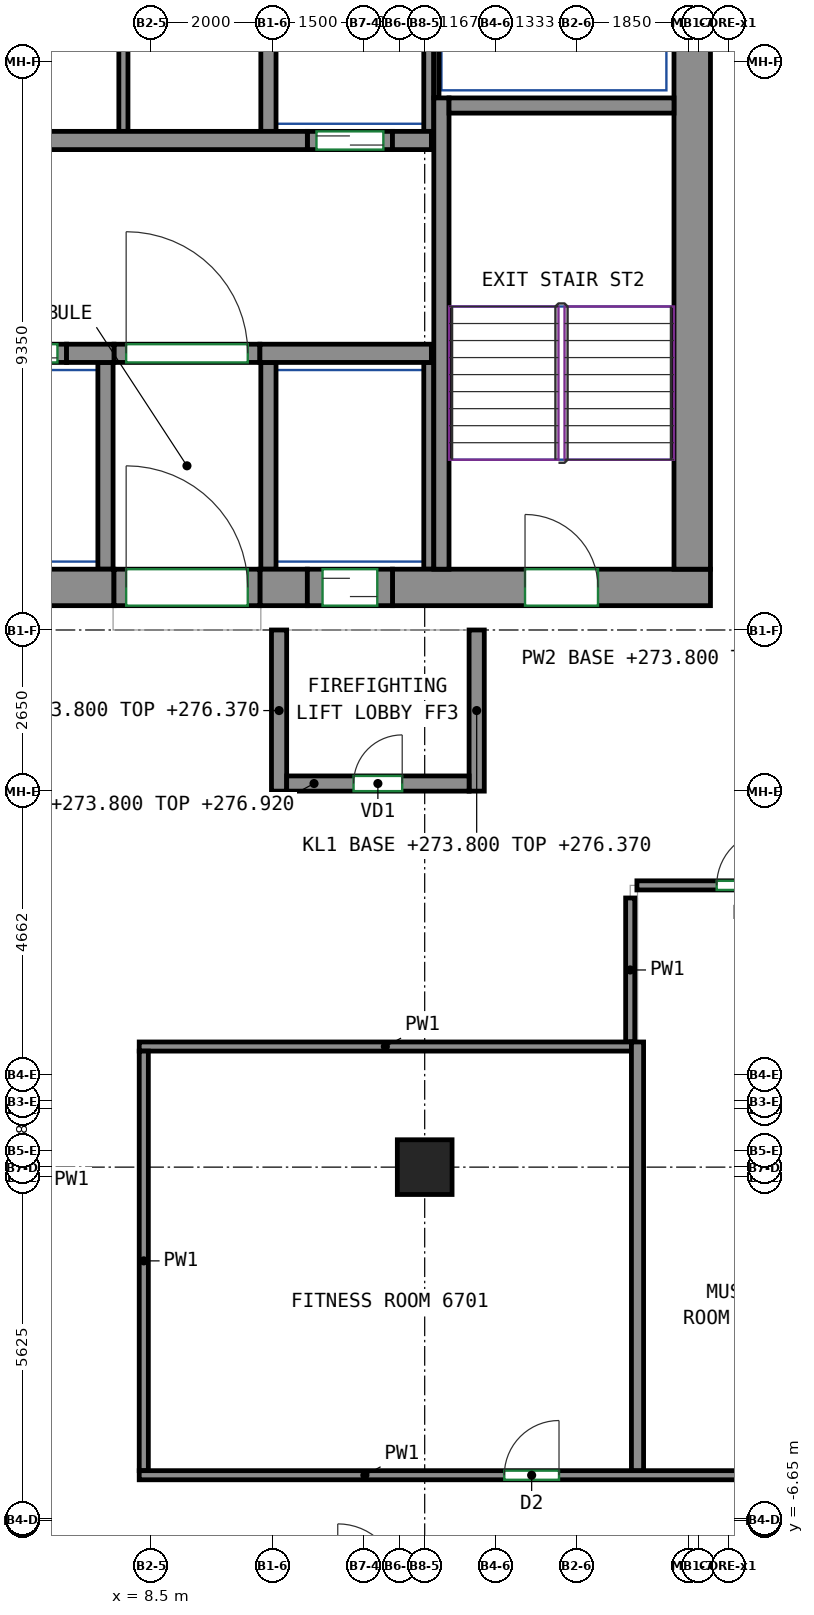
"""IFC4 building model, lengths in metres.
Left out: names, types, materials, properties, quantities, classifications, styles, units other than length and angle.
Written with IfcOpenShell. Run it as: python <this file> out.ifc"""

import sys

from ifc_helpers import new_model, si_unit, direction, frame, frame_2d, origin, origin_2d, place, context, subcontext, project, spatial, rectangle, extrude, source, transform, mapped, element, fill, save


model = new_model("IFC4")
c1 = context("Model", 3, precision=1e-05, world=origin(), true_north=direction((0.0, 1.0)))
c2 = subcontext(c1, "Body", "Model", "MODEL_VIEW")
j1 = project(units=[si_unit("LENGTHUNIT", "METRE"), si_unit("PLANEANGLEUNIT", "RADIAN")], contexts=[c1])
p1 = place(None, origin())
s1 = spatial("IfcSite", under=j1, at=p1, CompositionType="ELEMENT")
p2 = place(p1, origin())
s2 = spatial("IfcBuilding", under=s1, at=p2, CompositionType="ELEMENT")
p3 = place(p2, frame((0.0, 0.0, 273.8)))
s3 = spatial("IfcBuildingStorey", under=s2, at=p3, CompositionType="ELEMENT", Elevation=273.8)
m1 = source(origin(), c2, "Body", "SweptSolid", [
    extrude(rectangle(XDim=0.9, YDim=0.9, at=origin_2d()), origin(), (0.0, 0.0, 1.0), 3.12),
])
p4 = place(p3, frame((13.0, -0.833, 0.0), z_axis=(0.0, 0.0, 1.0), x_axis=(1.0, 0.0, 0.0)))
e1 = element("IfcColumn", 1, at=p4, inside=s3, PredefinedType="COLUMN", context=c2, shape_type="MappedRepresentation", body=[
    mapped(m1, transform((0.0, 0.0, 0.0))),
])
m2 = source(origin(), c2, "Body", "SweptSolid", [
    extrude(rectangle(XDim=14.18, YDim=0.6, at=frame_2d((7.09, 0.0))), origin(), (0.0, 0.0, 1.0), 3.12),
])
p5 = place(p3, frame((-6.29, 8.7, 0.0), z_axis=(0.0, 0.0, 1.0), x_axis=(1.0, 0.0, 0.0)))
e2 = element("IfcWall", 2, at=p5, inside=s3, PredefinedType="SHEAR", context=c2, shape_type="MappedRepresentation", body=[
    mapped(m2, transform((0.0, 0.0, 0.0))),
])
m3 = source(origin(), c2, "Body", "SweptSolid", [
    extrude(rectangle(XDim=0.78, YDim=0.6, at=frame_2d((0.39, 0.0))), origin(), (0.0, 0.0, 1.0), 3.12),
])
p6 = place(p3, frame((10.29, 8.7, 0.0), z_axis=(0.0, 0.0, 1.0), x_axis=(1.0, 0.0, 0.0)))
e3 = element("IfcWall", 3, at=p6, inside=s3, PredefinedType="SHEAR", context=c2, shape_type="MappedRepresentation", body=[
    mapped(m3, transform((0.0, 0.0, 0.0))),
])
m4 = source(origin(), c2, "Body", "SweptSolid", [
    extrude(rectangle(XDim=5.23, YDim=0.6, at=frame_2d((2.615, 0.0))), origin(), (0.0, 0.0, 1.0), 3.12),
])
p7 = place(p3, frame((12.47, 8.7, 0.0), z_axis=(0.0, 0.0, 1.0), x_axis=(1.0, 0.0, 0.0)))
e4 = element("IfcWall", 4, at=p7, inside=s3, PredefinedType="SHEAR", context=c2, shape_type="MappedRepresentation", body=[
    mapped(m4, transform((0.0, 0.0, 0.0))),
])
p8 = place(p7, frame((2.18, 0.0, 0.0)))
e5 = element("IfcOpeningElement", 5, at=p8, cuts=e4, PredefinedType="OPENING", context=c2, shape_type="SweptSolid", body=[
    extrude(rectangle(XDim=1.2, YDim=2.1, at=frame_2d((0.6, 1.05))), frame((0.0, 0.31, 0.0), z_axis=(0.0, -1.0, 0.0), x_axis=(1.0, 0.0, 0.0)), (0.0, 0.0, 1.0), 0.62),
])
m5 = source(origin(), c2, "Body", "SweptSolid", [
    extrude(rectangle(XDim=12.0, YDim=0.6, at=frame_2d((6.0, 0.0))), origin(), (0.0, 0.0, 1.0), 3.12),
])
p9 = place(p3, frame((17.4, 9.0, 0.0), z_axis=(0.0, 0.0, 1.0), x_axis=(0.0, 1.0, 0.0)))
e6 = element("IfcWall", 6, at=p9, inside=s3, PredefinedType="SHEAR", context=c2, shape_type="MappedRepresentation", body=[
    mapped(m5, transform((0.0, 0.0, 0.0))),
])
m6 = source(origin(), c2, "Body", "SweptSolid", [
    extrude(rectangle(XDim=7.75, YDim=0.25, at=frame_2d((3.875, 0.0))), origin(), (0.0, 0.0, 1.0), 3.12),
])
p10 = place(p3, frame((13.275, 9.0, 0.0), z_axis=(0.0, 0.0, 1.0), x_axis=(0.0, 1.0, 0.0)))
e7 = element("IfcWall", 7, at=p10, inside=s3, PredefinedType="SHEAR", context=c2, shape_type="MappedRepresentation", body=[
    mapped(m6, transform((0.0, 0.0, 0.0))),
])
m7 = source(origin(), c2, "Body", "SweptSolid", [
    extrude(rectangle(XDim=3.7, YDim=0.25, at=frame_2d((1.85, 0.0))), origin(), (0.0, 0.0, 1.0), 3.12),
])
p11 = place(p3, frame((13.4, 16.625, 0.0), z_axis=(0.0, 0.0, 1.0), x_axis=(1.0, 0.0, 0.0)))
e8 = element("IfcWall", 8, at=p11, inside=s3, PredefinedType="SHEAR", context=c2, shape_type="MappedRepresentation", body=[
    mapped(m7, transform((0.0, 0.0, 0.0))),
])
m8 = source(origin(), c2, "Body", "SweptSolid", [
    extrude(rectangle(XDim=0.78, YDim=0.3, at=frame_2d((0.39, 0.0))), origin(), (0.0, 0.0, 1.0), 3.12),
])
p12 = place(p3, frame((7.11, 12.55, 0.0), z_axis=(0.0, 0.0, 1.0), x_axis=(1.0, 0.0, 0.0)))
e9 = element("IfcWall", 9, at=p12, inside=s3, PredefinedType="SHEAR", context=c2, shape_type="MappedRepresentation", body=[
    mapped(m8, transform((0.0, 0.0, 0.0))),
])
m9 = source(origin(), c2, "Body", "SweptSolid", [
    extrude(rectangle(XDim=2.82, YDim=0.3, at=frame_2d((1.41, 0.0))), origin(), (0.0, 0.0, 1.0), 3.12),
])
p13 = place(p3, frame((10.29, 12.55, 0.0), z_axis=(0.0, 0.0, 1.0), x_axis=(1.0, 0.0, 0.0)))
e10 = element("IfcWall", 10, at=p13, inside=s3, PredefinedType="SHEAR", context=c2, shape_type="MappedRepresentation", body=[
    mapped(m9, transform((0.0, 0.0, 0.0))),
])
m10 = source(origin(), c2, "Body", "SweptSolid", [
    extrude(rectangle(XDim=22.08, YDim=0.3, at=frame_2d((11.04, 0.0))), origin(), (0.0, 0.0, 1.0), 3.12),
])
p14 = place(p3, frame((-11.01, 16.05, 0.0), z_axis=(0.0, 0.0, 1.0), x_axis=(1.0, 0.0, 0.0)))
e11 = element("IfcWall", 11, at=p14, inside=s3, PredefinedType="SHEAR", context=c2, shape_type="MappedRepresentation", body=[
    mapped(m10, transform((0.0, 0.0, 0.0))),
])
m11 = source(origin(), c2, "Body", "SweptSolid", [
    extrude(rectangle(XDim=0.64, YDim=0.3, at=frame_2d((0.32, 0.0))), origin(), (0.0, 0.0, 1.0), 3.12),
])
p15 = place(p3, frame((12.47, 16.05, 0.0), z_axis=(0.0, 0.0, 1.0), x_axis=(1.0, 0.0, 0.0)))
e12 = element("IfcWall", 12, at=p15, inside=s3, PredefinedType="SHEAR", context=c2, shape_type="MappedRepresentation", body=[
    mapped(m11, transform((0.0, 0.0, 0.0))),
])
m12 = source(origin(), c2, "Body", "SweptSolid", [
    extrude(rectangle(XDim=1.4, YDim=0.3, at=frame_2d((0.7, 0.0))), origin(), (0.0, 0.0, 1.0), 3.12),
])
p16 = place(p3, frame((5.71, 12.55, 0.0), z_axis=(0.0, 0.0, 1.0), x_axis=(1.0, 0.0, 0.0)))
e13 = element("IfcWall", 13, at=p16, inside=s3, PredefinedType="PARTITIONING", context=c2, shape_type="MappedRepresentation", body=[
    mapped(m12, transform((0.0, 0.0, 0.0))),
])
p17 = place(p16, frame((0.15, 0.0, 0.0)))
e14 = element("IfcOpeningElement", 14, at=p17, cuts=e13, PredefinedType="OPENING", context=c2, shape_type="SweptSolid", body=[
    extrude(rectangle(XDim=1.1, YDim=2.1, at=frame_2d((0.55, 1.05))), frame((0.0, 0.16, 0.0), z_axis=(0.0, -1.0, 0.0), x_axis=(1.0, 0.0, 0.0)), (0.0, 0.0, 1.0), 0.32),
])
m13 = source(origin(), c2, "Body", "SweptSolid", [
    extrude(rectangle(XDim=1.4, YDim=0.3, at=frame_2d((0.7, 0.0))), origin(), (0.0, 0.0, 1.0), 3.12),
])
p18 = place(p3, frame((11.07, 16.05, 0.0), z_axis=(0.0, 0.0, 1.0), x_axis=(1.0, 0.0, 0.0)))
e15 = element("IfcWall", 15, at=p18, inside=s3, PredefinedType="PARTITIONING", context=c2, shape_type="MappedRepresentation", body=[
    mapped(m13, transform((0.0, 0.0, 0.0))),
])
p19 = place(p18, frame((0.15, 0.0, 0.0)))
e16 = element("IfcOpeningElement", 16, at=p19, cuts=e15, PredefinedType="OPENING", context=c2, shape_type="SweptSolid", body=[
    extrude(rectangle(XDim=1.1, YDim=2.1, at=frame_2d((0.55, 1.05))), frame((0.0, 0.16, 0.0), z_axis=(0.0, -1.0, 0.0), x_axis=(1.0, 0.0, 0.0)), (0.0, 0.0, 1.0), 0.32),
])
m14 = source(origin(), c2, "Body", "SweptSolid", [
    extrude(rectangle(XDim=2.4, YDim=0.3, at=frame_2d((1.2, 0.0))), origin(), (0.0, 0.0, 1.0), 3.12),
])
p20 = place(p3, frame((7.89, 12.55, 0.0), z_axis=(0.0, 0.0, 1.0), x_axis=(1.0, 0.0, 0.0)))
e17 = element("IfcWall", 17, at=p20, inside=s3, PredefinedType="PARTITIONING", context=c2, shape_type="MappedRepresentation", body=[
    mapped(m14, transform((0.0, 0.0, 0.0))),
])
p21 = place(p20, frame((0.2, 0.0, 0.0)))
e18 = element("IfcOpeningElement", 18, at=p21, cuts=e17, PredefinedType="OPENING", context=c2, shape_type="SweptSolid", body=[
    extrude(rectangle(XDim=2.0, YDim=2.1, at=frame_2d((1.0, 1.05))), frame((0.0, 0.16, 0.0), z_axis=(0.0, -1.0, 0.0), x_axis=(1.0, 0.0, 0.0)), (0.0, 0.0, 1.0), 0.32),
])
m15 = source(origin(), c2, "Body", "SweptSolid", [
    extrude(rectangle(XDim=2.65, YDim=0.25, at=frame_2d((1.325, 0.0))), origin(), (0.0, 0.0, 1.0), 2.57),
])
for number, where, z_axis, x_axis in (
    (19, (10.605, 5.35, 0.0), (0.0, 0.0, 1.0), (0.0, 1.0, 0.0)),
    (20, (13.855, 5.35, 0.0), (0.0, 0.0, 1.0), (0.0, 1.0, 0.0)),
):
    element("IfcWall", number, at=place(p3, frame(where, z_axis=z_axis, x_axis=x_axis)), inside=s3, PredefinedType="PARTITIONING", context=c2, shape_type="MappedRepresentation", body=[
        mapped(m15, transform((0.0, 0.0, 0.0))),
    ])
m16 = source(origin(), c2, "Body", "SweptSolid", [
    extrude(rectangle(XDim=3.0, YDim=0.25, at=frame_2d((1.5, 0.0))), origin(), (0.0, 0.0, 1.0), 3.12),
])
p22 = place(p3, frame((10.73, 5.475, 0.0), z_axis=(0.0, 0.0, 1.0), x_axis=(1.0, 0.0, 0.0)))
e21 = element("IfcWall", 21, at=p22, inside=s3, PredefinedType="PARTITIONING", context=c2, shape_type="MappedRepresentation", body=[
    mapped(m16, transform((0.0, 0.0, 0.0))),
])
p23 = place(p22, frame((1.1, 0.0, 0.0)))
e22 = element("IfcOpeningElement", 22, at=p23, cuts=e21, PredefinedType="OPENING", context=c2, shape_type="SweptSolid", body=[
    extrude(rectangle(XDim=0.8, YDim=2.0, at=frame_2d((0.4, 1.0))), frame((0.0, 0.135, 0.0), z_axis=(0.0, -1.0, 0.0), x_axis=(1.0, 0.0, 0.0)), (0.0, 0.0, 1.0), 0.27),
])
m17 = source(origin(), c2, "Body", "SweptSolid", [
    extrude(rectangle(XDim=3.275, YDim=0.165, at=frame_2d((1.638, 0.0))), origin(), (0.0, 0.0, 1.0), 3.12),
])
p24 = place(p3, frame((13.067, 16.2, 0.0), z_axis=(0.0, 0.0, 1.0), x_axis=(0.0, 1.0, 0.0)))
e23 = element("IfcWall", 23, at=p24, inside=s3, PredefinedType="PARTITIONING", context=c2, shape_type="MappedRepresentation", body=[
    mapped(m17, transform((0.0, 0.0, 0.0))),
])
m18 = source(origin(), c2, "Body", "SweptSolid", [
    extrude(rectangle(XDim=3.275, YDim=0.25, at=frame_2d((1.638, 0.0))), origin(), (0.0, 0.0, 1.0), 3.12),
])
p25 = place(p3, frame((10.43, 16.2, 0.0), z_axis=(0.0, 0.0, 1.0), x_axis=(0.0, 1.0, 0.0)))
e24 = element("IfcWall", 24, at=p25, inside=s3, PredefinedType="PARTITIONING", context=c2, shape_type="MappedRepresentation", body=[
    mapped(m18, transform((0.0, 0.0, 0.0))),
])
m19 = source(origin(), c2, "Body", "SweptSolid", [
    extrude(rectangle(XDim=2.725, YDim=0.085, at=frame_2d((1.363, 0.0))), origin(), (0.0, 0.0, 1.0), 3.12),
])
p26 = place(p3, frame((13.192, 16.75, 0.0), z_axis=(0.0, 0.0, 1.0), x_axis=(0.0, 1.0, 0.0)))
e25 = element("IfcWall", 25, at=p26, inside=s3, PredefinedType="PARTITIONING", context=c2, shape_type="MappedRepresentation", body=[
    mapped(m19, transform((0.0, 0.0, 0.0))),
])
m20 = source(origin(), c2, "Body", "SweptSolid", [
    extrude(rectangle(XDim=3.4, YDim=0.25, at=frame_2d((1.7, 0.0))), origin(), (0.0, 0.0, 1.0), 3.12),
])
p27 = place(p3, frame((10.43, 9.0, 0.0), z_axis=(0.0, 0.0, 1.0), x_axis=(0.0, 1.0, 0.0)))
e26 = element("IfcWall", 26, at=p27, inside=s3, PredefinedType="PARTITIONING", context=c2, shape_type="MappedRepresentation", body=[
    mapped(m20, transform((0.0, 0.0, 0.0))),
])
m21 = source(origin(), c2, "Body", "SweptSolid", [
    extrude(rectangle(XDim=3.4, YDim=0.165, at=frame_2d((1.7, 0.0))), origin(), (0.0, 0.0, 1.0), 3.12),
])
p28 = place(p3, frame((13.067, 9.0, 0.0), z_axis=(0.0, 0.0, 1.0), x_axis=(0.0, 1.0, 0.0)))
e27 = element("IfcWall", 27, at=p28, inside=s3, PredefinedType="PARTITIONING", context=c2, shape_type="MappedRepresentation", body=[
    mapped(m21, transform((0.0, 0.0, 0.0))),
])
p29 = place(p3, frame((7.75, 9.0, 0.0), z_axis=(0.0, 0.0, 1.0), x_axis=(0.0, 1.0, 0.0)))
e28 = element("IfcWall", 28, at=p29, inside=s3, PredefinedType="PARTITIONING", context=c2, shape_type="MappedRepresentation", body=[
    mapped(m20, transform((0.0, 0.0, 0.0))),
])
m22 = source(origin(), c2, "Body", "SweptSolid", [
    extrude(rectangle(XDim=4.8, YDim=0.15, at=frame_2d((2.4, 0.0))), origin(), (0.0, 0.0, 1.0), 3.12),
])
p30 = place(p3, frame((8.045, 16.2, 0.0), z_axis=(0.0, 0.0, 1.0), x_axis=(0.0, 1.0, 0.0)))
e29 = element("IfcWall", 29, at=p30, inside=s3, PredefinedType="PARTITIONING", context=c2, shape_type="MappedRepresentation", body=[
    mapped(m22, transform((0.0, 0.0, 0.0))),
])
m23 = source(origin(), c2, "Body", "SweptSolid", [
    extrude(rectangle(XDim=2.4, YDim=0.6, at=frame_2d((1.2, 0.0))), origin(), (0.0, 0.0, 1.0), 2.7),
])
p31 = place(p3, frame((7.89, 8.7, 0.0), z_axis=(0.0, 0.0, 1.0), x_axis=(1.0, 0.0, 0.0)))
e30 = element("IfcWall", 30, at=p31, inside=s3, PredefinedType="PARTITIONING", context=c2, shape_type="MappedRepresentation", body=[
    mapped(m23, transform((0.0, 0.0, 0.0))),
])
p32 = place(p31, frame((0.2, 0.0, 0.0)))
e31 = element("IfcOpeningElement", 31, at=p32, cuts=e30, PredefinedType="OPENING", context=c2, shape_type="SweptSolid", body=[
    extrude(rectangle(XDim=2.0, YDim=2.1, at=frame_2d((1.0, 1.05))), frame((0.0, 0.31, 0.0), z_axis=(0.0, -1.0, 0.0), x_axis=(1.0, 0.0, 0.0)), (0.0, 0.0, 1.0), 0.62),
])
m24 = source(origin(), c2, "Body", "SweptSolid", [
    extrude(rectangle(XDim=1.4, YDim=0.6, at=frame_2d((0.7, 0.0))), origin(), (0.0, 0.0, 1.0), 2.7),
])
p33 = place(p3, frame((11.07, 8.7, 0.0), z_axis=(0.0, 0.0, 1.0), x_axis=(1.0, 0.0, 0.0)))
e32 = element("IfcWall", 32, at=p33, inside=s3, PredefinedType="PARTITIONING", context=c2, shape_type="MappedRepresentation", body=[
    mapped(m24, transform((0.0, 0.0, 0.0))),
])
p34 = place(p33, frame((0.25, 0.0, 0.0)))
e33 = element("IfcOpeningElement", 33, at=p34, cuts=e32, PredefinedType="OPENING", context=c2, shape_type="SweptSolid", body=[
    extrude(rectangle(XDim=0.9, YDim=2.1, at=frame_2d((0.45, 1.05))), frame((0.0, 0.31, 0.0), z_axis=(0.0, -1.0, 0.0), x_axis=(1.0, 0.0, 0.0)), (0.0, 0.0, 1.0), 0.62),
])
p35 = place(p3, frame((16.38, 1.225, 0.0), z_axis=(0.0, 0.0, 1.0), x_axis=(0.0, 1.0, 0.0)))
e34 = element("IfcWall", 34, at=p35, inside=s3, PredefinedType="PARTITIONING", context=c2, shape_type="SweptSolid", body=[
    extrude(rectangle(XDim=2.368, YDim=0.15, at=frame_2d((1.184, 0.0))), origin(), (0.0, 0.0, 1.0), 3.12),
])
p36 = place(p3, frame((8.305, 1.15, 0.0), z_axis=(0.0, 0.0, 1.0), x_axis=(1.0, 0.0, 0.0)))
e35 = element("IfcWall", 35, at=p36, inside=s3, PredefinedType="PARTITIONING", context=c2, shape_type="SweptSolid", body=[
    extrude(rectangle(XDim=8.095, YDim=0.15, at=frame_2d((4.047, 0.0))), origin(), (0.0, 0.0, 1.0), 3.12),
])
p37 = place(p3, frame((8.38, -5.825, 0.0), z_axis=(0.0, 0.0, 1.0), x_axis=(0.0, 1.0, 0.0)))
e36 = element("IfcWall", 36, at=p37, inside=s3, PredefinedType="PARTITIONING", context=c2, shape_type="SweptSolid", body=[
    extrude(rectangle(XDim=6.9, YDim=0.15, at=frame_2d((3.45, 0.0))), origin(), (0.0, 0.0, 1.0), 3.12),
])
p38 = place(p3, frame((8.305, -5.9, 0.0), z_axis=(0.0, 0.0, 1.0), x_axis=(1.0, 0.0, 0.0)))
e37 = element("IfcWall", 37, at=p38, inside=s3, PredefinedType="PARTITIONING", context=c2, shape_type="SweptSolid", body=[
    extrude(rectangle(XDim=12.37, YDim=0.15, at=frame_2d((6.185, 0.0))), origin(), (0.0, 0.0, 1.0), 3.12),
])
p39 = place(p38, frame((6.004, 0.0, 0.0)))
e38 = element("IfcOpeningElement", 38, at=p39, cuts=e37, PredefinedType="OPENING", context=c2, shape_type="SweptSolid", body=[
    extrude(rectangle(XDim=0.9, YDim=2.1, at=frame_2d((0.45, 1.05))), frame((0.0, 0.085, 0.0), z_axis=(0.0, -1.0, 0.0), x_axis=(1.0, 0.0, 0.0)), (0.0, 0.0, 1.0), 0.17),
])
p40 = place(p3, frame((16.49, 3.8, 0.0), z_axis=(0.0, 0.0, 1.0), x_axis=(1.0, 0.0, 0.0)))
e39 = element("IfcWall", 39, at=p40, inside=s3, PredefinedType="PARTITIONING", context=c2, shape_type="SweptSolid", body=[
    extrude(rectangle(XDim=4.085, YDim=0.15, at=frame_2d((2.042, 0.0))), origin(), (0.0, 0.0, 1.0), 3.12),
])
p41 = place(p40, frame((1.312, 0.0, 0.0)))
e40 = element("IfcOpeningElement", 40, at=p41, cuts=e39, PredefinedType="OPENING", context=c2, shape_type="SweptSolid", body=[
    extrude(rectangle(XDim=0.9, YDim=2.1, at=frame_2d((0.45, 1.05))), frame((0.0, 0.085, 0.0), z_axis=(0.0, -1.0, 0.0), x_axis=(1.0, 0.0, 0.0)), (0.0, 0.0, 1.0), 0.17),
])
p42 = place(p3, frame((16.5, -5.823, 0.0), z_axis=(0.0, 0.0, 1.0), x_axis=(0.0, 1.0, 0.0)))
e41 = element("IfcWall", 41, at=p42, inside=s3, PredefinedType="PARTITIONING", context=c2, shape_type="SweptSolid", body=[
    extrude(rectangle(XDim=7.048, YDim=0.2, at=frame_2d((3.524, 0.0))), origin(), (0.0, 0.0, 1.0), 3.12),
])
p43 = place(p21, origin())
e42 = element("IfcDoor", 42, at=p43, inside=s3, OperationType="DOUBLE_DOOR_SINGLE_SWING", PredefinedType="DOOR", context=c2, shape_type="SweptSolid", body=[
    extrude(rectangle(XDim=2.0, YDim=2.1, at=frame_2d((1.0, 1.05))), frame((0.0, 0.025, 0.0), z_axis=(0.0, -1.0, 0.0), x_axis=(1.0, 0.0, 0.0)), (0.0, 0.0, 1.0), 0.05),
])
fill(e18, e42)
p44 = place(p32, origin())
e43 = element("IfcDoor", 43, at=p44, inside=s3, OperationType="DOUBLE_DOOR_SINGLE_SWING", PredefinedType="DOOR", context=c2, shape_type="SweptSolid", body=[
    extrude(rectangle(XDim=2.0, YDim=2.1, at=frame_2d((1.0, 1.05))), frame((0.0, 0.205, 0.0), z_axis=(0.0, -1.0, 0.0), x_axis=(1.0, 0.0, 0.0)), (0.0, 0.0, 1.0), 0.05),
])
fill(e31, e43)
p45 = place(p23, origin())
e44 = element("IfcDoor", 44, at=p45, inside=s3, OperationType="SINGLE_SWING_RIGHT", PredefinedType="DOOR", context=c2, shape_type="SweptSolid", body=[
    extrude(rectangle(XDim=0.8, YDim=2.0, at=frame_2d((0.4, 1.0))), frame((0.0, 0.025, 0.0), z_axis=(0.0, -1.0, 0.0), x_axis=(1.0, 0.0, 0.0)), (0.0, 0.0, 1.0), 0.05),
])
fill(e22, e44)
p46 = place(p34, origin())
e45 = element("IfcDoor", 45, at=p46, inside=s3, OperationType="SLIDING_TO_LEFT", PredefinedType="DOOR", context=c2, shape_type="SweptSolid", body=[
    extrude(rectangle(XDim=0.9, YDim=2.1, at=frame_2d((0.45, 1.05))), frame((0.0, 0.205, 0.0), z_axis=(0.0, -1.0, 0.0), x_axis=(1.0, 0.0, 0.0)), (0.0, 0.0, 1.0), 0.05),
])
fill(e33, e45)
p47 = place(p17, origin())
e46 = element("IfcDoor", 46, at=p47, inside=s3, OperationType="DOUBLE_DOOR_SLIDING", PredefinedType="DOOR", context=c2, shape_type="SweptSolid", body=[
    extrude(rectangle(XDim=1.1, YDim=2.1, at=frame_2d((0.55, 1.05))), frame((0.0, 0.025, 0.0), z_axis=(0.0, -1.0, 0.0), x_axis=(1.0, 0.0, 0.0)), (0.0, 0.0, 1.0), 0.05),
])
fill(e14, e46)
p48 = place(p19, origin())
e47 = element("IfcDoor", 47, at=p48, inside=s3, OperationType="DOUBLE_DOOR_SLIDING", PredefinedType="DOOR", context=c2, shape_type="SweptSolid", body=[
    extrude(rectangle(XDim=1.1, YDim=2.1, at=frame_2d((0.55, 1.05))), frame((0.0, 0.025, 0.0), z_axis=(0.0, -1.0, 0.0), x_axis=(1.0, 0.0, 0.0)), (0.0, 0.0, 1.0), 0.05),
])
fill(e16, e47)
p49 = place(p8, origin())
e48 = element("IfcDoor", 48, at=p49, inside=s3, OperationType="DOUBLE_DOOR_SINGLE_SWING", PredefinedType="DOOR", context=c2, shape_type="SweptSolid", body=[
    extrude(rectangle(XDim=1.2, YDim=2.1, at=frame_2d((0.6, 1.05))), frame((0.0, 0.205, 0.0), z_axis=(0.0, -1.0, 0.0), x_axis=(1.0, 0.0, 0.0)), (0.0, 0.0, 1.0), 0.05),
])
fill(e5, e48)
p50 = place(p39, origin())
e49 = element("IfcDoor", 49, at=p50, inside=s3, OperationType="SINGLE_SWING_RIGHT", PredefinedType="DOOR", context=c2, shape_type="SweptSolid", body=[
    extrude(rectangle(XDim=0.9, YDim=2.1, at=frame_2d((0.45, 1.05))), frame((0.0, 0.025, 0.0), z_axis=(0.0, -1.0, 0.0), x_axis=(1.0, 0.0, 0.0)), (0.0, 0.0, 1.0), 0.05),
])
fill(e38, e49)
p51 = place(p41, origin())
e50 = element("IfcDoor", 50, at=p51, inside=s3, OperationType="SINGLE_SWING_RIGHT", PredefinedType="DOOR", context=c2, shape_type="SweptSolid", body=[
    extrude(rectangle(XDim=0.9, YDim=2.1, at=frame_2d((0.45, 1.05))), frame((0.0, 0.025, 0.0), z_axis=(0.0, -1.0, 0.0), x_axis=(1.0, 0.0, 0.0)), (0.0, 0.0, 1.0), 0.05),
])
fill(e40, e50)
save(model, sys.argv[1])
